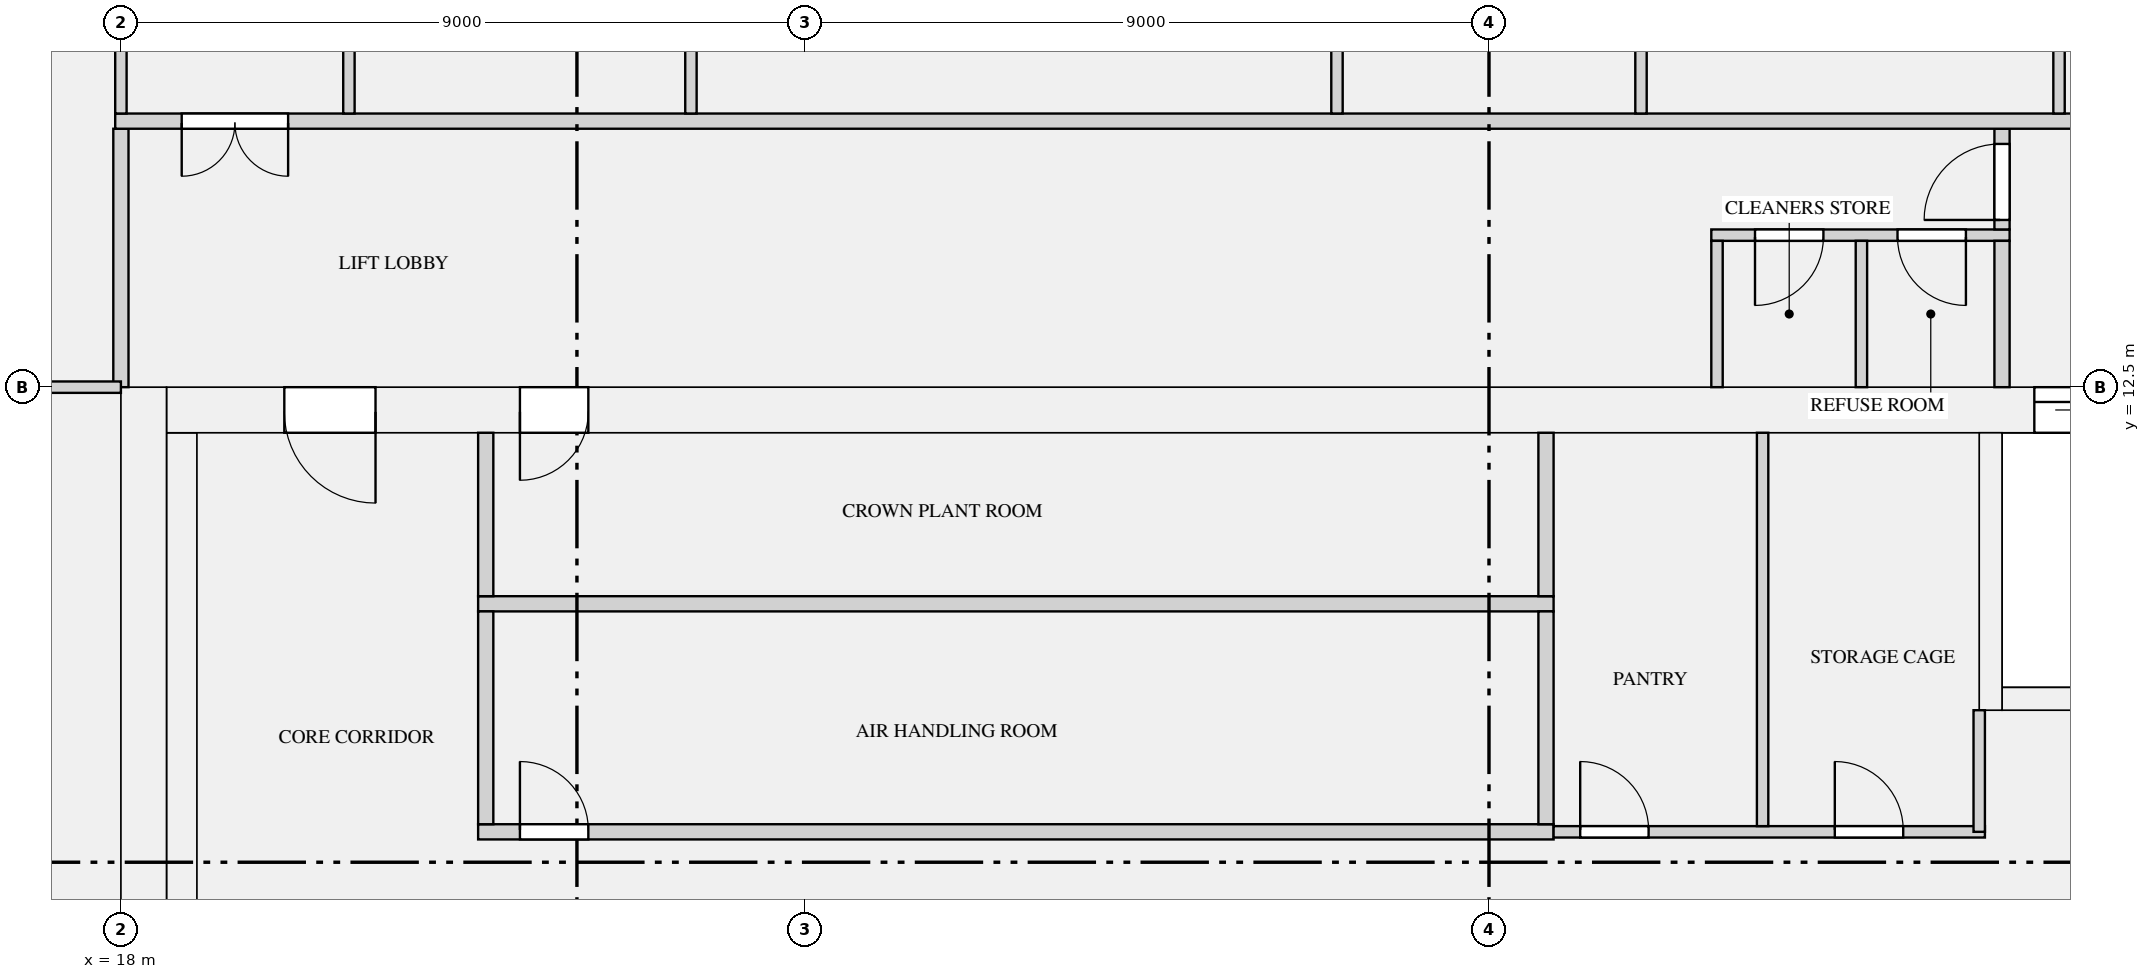
"""IFC4 building model, lengths in metres.
Left out: names, types, materials, properties, quantities, classifications, styles, units other than length and angle.
Written with IfcOpenShell. Run it as: python <this file> out.ifc"""

import sys

from ifc_helpers import new_model, si_unit, direction, frame, frame_2d, origin, place, context, subcontext, project, spatial, rectangle, extrude, element, fill, save


model = new_model("IFC4")
c1 = context("Model", 3, precision=1e-05, world=origin(), true_north=direction((0.0, 1.0)))
c2 = subcontext(c1, "Body", "Model", "MODEL_VIEW")
j1 = project(units=[si_unit("LENGTHUNIT", "METRE"), si_unit("PLANEANGLEUNIT", "RADIAN")], contexts=[c1])
p1 = place(None, origin())
s1 = spatial("IfcSite", under=j1, at=p1, CompositionType="ELEMENT")
p2 = place(p1, origin())
s2 = spatial("IfcBuilding", under=s1, at=p2, CompositionType="ELEMENT")
p3 = place(p2, frame((0.0, 0.0, 191.7)))
s3 = spatial("IfcBuildingStorey", under=s2, at=p3, CompositionType="ELEMENT", Elevation=191.7)
p4 = place(p3, frame((18.3, 0.0, 0.0), z_axis=(0.0, 0.0, 1.0), x_axis=(0.0, 1.0, 0.0)))
e1 = element("IfcWall", 1, at=p4, inside=s3, PredefinedType="SHEAR", context=c2, shape_type="SweptSolid", body=[
    extrude(rectangle(XDim=12.5, YDim=0.6, at=frame_2d((6.25, 0.0))), origin(), (0.0, 0.0, 1.0), 6.3),
])
p5 = place(p3, frame((18.6, 12.2, 0.0), z_axis=(0.0, 0.0, 1.0), x_axis=(1.0, 0.0, 0.0)))
e2 = element("IfcWall", 2, at=p5, inside=s3, PredefinedType="SHEAR", context=c2, shape_type="SweptSolid", body=[
    extrude(rectangle(XDim=34.8, YDim=0.6, at=frame_2d((17.4, 0.0))), origin(), (0.0, 0.0, 1.0), 6.3),
])
p6 = place(p5, frame((24.575, 0.0, 0.0)))
e3 = element("IfcOpeningElement", 3, at=p6, cuts=e2, PredefinedType="OPENING", context=c2, shape_type="SweptSolid", body=[
    extrude(rectangle(XDim=1.1, YDim=2.1, at=frame_2d((0.55, 1.05))), frame((0.0, 0.31, 0.0), z_axis=(0.0, -1.0, 0.0), x_axis=(1.0, 0.0, 0.0)), (0.0, 0.0, 1.0), 0.62),
])
p7 = place(p5, frame((26.825, 0.0, 0.0)))
e4 = element("IfcOpeningElement", 4, at=p7, cuts=e2, PredefinedType="OPENING", context=c2, shape_type="SweptSolid", body=[
    extrude(rectangle(XDim=1.1, YDim=2.1, at=frame_2d((0.55, 1.05))), frame((0.0, 0.31, 0.0), z_axis=(0.0, -1.0, 0.0), x_axis=(1.0, 0.0, 0.0)), (0.0, 0.0, 1.0), 0.62),
])
p8 = place(p5, frame((29.075, 0.0, 0.0)))
e5 = element("IfcOpeningElement", 5, at=p8, cuts=e2, PredefinedType="OPENING", context=c2, shape_type="SweptSolid", body=[
    extrude(rectangle(XDim=1.1, YDim=2.1, at=frame_2d((0.55, 1.05))), frame((0.0, 0.31, 0.0), z_axis=(0.0, -1.0, 0.0), x_axis=(1.0, 0.0, 0.0)), (0.0, 0.0, 1.0), 0.62),
])
p9 = place(p5, frame((4.65, 0.0, 0.0)))
e6 = element("IfcOpeningElement", 6, at=p9, cuts=e2, PredefinedType="OPENING", context=c2, shape_type="SweptSolid", body=[
    extrude(rectangle(XDim=0.9, YDim=2.1, at=frame_2d((0.45, 1.05))), frame((0.0, 0.31, 0.0), z_axis=(0.0, -1.0, 0.0), x_axis=(1.0, 0.0, 0.0)), (0.0, 0.0, 1.0), 0.62),
])
p10 = place(p5, frame((1.55, 0.0, 0.0)))
e7 = element("IfcOpeningElement", 7, at=p10, cuts=e2, PredefinedType="OPENING", context=c2, shape_type="SweptSolid", body=[
    extrude(rectangle(XDim=1.2, YDim=2.1, at=frame_2d((0.6, 1.05))), frame((0.0, 0.31, 0.0), z_axis=(0.0, -1.0, 0.0), x_axis=(1.0, 0.0, 0.0)), (0.0, 0.0, 1.0), 0.62),
])
p11 = place(p5, frame((32.05, 0.0, 0.0)))
e8 = element("IfcOpeningElement", 8, at=p11, cuts=e2, PredefinedType="OPENING", context=c2, shape_type="SweptSolid", body=[
    extrude(rectangle(XDim=1.2, YDim=2.1, at=frame_2d((0.6, 1.05))), frame((0.0, 0.31, 0.0), z_axis=(0.0, -1.0, 0.0), x_axis=(1.0, 0.0, 0.0)), (0.0, 0.0, 1.0), 0.62),
])
p12 = place(p3, frame((18.8, 1.0, 0.0), z_axis=(0.0, 0.0, 1.0), x_axis=(0.0, 1.0, 0.0)))
e9 = element("IfcWall", 9, at=p12, inside=s3, PredefinedType="SHEAR", context=c2, shape_type="SweptSolid", body=[
    extrude(rectangle(XDim=10.9, YDim=0.4, at=frame_2d((5.45, 0.0))), origin(), (0.0, 0.0, 1.0), 6.3),
])
p13 = place(p3, frame((42.75, 8.4, 0.0), z_axis=(0.0, 0.0, 1.0), x_axis=(1.0, 0.0, 0.0)))
e10 = element("IfcWall", 10, at=p13, inside=s3, PredefinedType="SHEAR", context=c2, shape_type="SweptSolid", body=[
    extrude(rectangle(XDim=1.95, YDim=0.3, at=frame_2d((0.975, 0.0))), origin(), (0.0, 0.0, 1.0), 6.3),
])
p14 = place(p3, frame((42.6, 8.25, 0.0), z_axis=(0.0, 0.0, 1.0), x_axis=(0.0, 1.0, 0.0)))
e11 = element("IfcWall", 11, at=p14, inside=s3, PredefinedType="SHEAR", context=c2, shape_type="SweptSolid", body=[
    extrude(rectangle(XDim=3.65, YDim=0.3, at=frame_2d((1.825, 0.0))), origin(), (0.0, 0.0, 1.0), 6.3),
])
p15 = place(p3, frame((22.7, 6.65, 0.0), z_axis=(0.0, 0.0, 1.0), x_axis=(1.0, 0.0, 0.0)))
e12 = element("IfcWall", 12, at=p15, inside=s3, PredefinedType="PARTITIONING", context=c2, shape_type="SweptSolid", body=[
    extrude(rectangle(XDim=14.15, YDim=0.2, at=frame_2d((7.075, 0.0))), origin(), (0.0, 0.0, 1.0), 5.98),
])
p16 = place(p15, frame((0.55, 0.0, 0.0)))
e13 = element("IfcOpeningElement", 13, at=p16, cuts=e12, PredefinedType="OPENING", context=c2, shape_type="SweptSolid", body=[
    extrude(rectangle(XDim=0.9, YDim=2.1, at=frame_2d((0.45, 1.05))), frame((0.0, 0.11, 0.0), z_axis=(0.0, -1.0, 0.0), x_axis=(1.0, 0.0, 0.0)), (0.0, 0.0, 1.0), 0.22),
])
p17 = place(p3, frame((36.85, 6.65, 0.0), z_axis=(0.0, 0.0, 1.0), x_axis=(1.0, 0.0, 0.0)))
e14 = element("IfcWall", 14, at=p17, inside=s3, PredefinedType="PARTITIONING", context=c2, shape_type="SweptSolid", body=[
    extrude(rectangle(XDim=5.675, YDim=0.15, at=frame_2d((2.837, 0.0))), origin(), (0.0, 0.0, 1.0), 5.98),
])
p18 = place(p17, frame((0.35, 0.0, 0.0)))
e15 = element("IfcOpeningElement", 15, at=p18, cuts=e14, PredefinedType="OPENING", context=c2, shape_type="SweptSolid", body=[
    extrude(rectangle(XDim=0.9, YDim=2.1, at=frame_2d((0.45, 1.05))), frame((0.0, 0.085, 0.0), z_axis=(0.0, -1.0, 0.0), x_axis=(1.0, 0.0, 0.0)), (0.0, 0.0, 1.0), 0.17),
])
p19 = place(p17, frame((3.7, 0.0, 0.0)))
e16 = element("IfcOpeningElement", 16, at=p19, cuts=e14, PredefinedType="OPENING", context=c2, shape_type="SweptSolid", body=[
    extrude(rectangle(XDim=0.9, YDim=2.1, at=frame_2d((0.45, 1.05))), frame((0.0, 0.085, 0.0), z_axis=(0.0, -1.0, 0.0), x_axis=(1.0, 0.0, 0.0)), (0.0, 0.0, 1.0), 0.17),
])
p20 = place(p3, frame((22.7, 9.65, 0.0), z_axis=(0.0, 0.0, 1.0), x_axis=(1.0, 0.0, 0.0)))
e17 = element("IfcWall", 17, at=p20, inside=s3, PredefinedType="PARTITIONING", context=c2, shape_type="SweptSolid", body=[
    extrude(rectangle(XDim=14.15, YDim=0.2, at=frame_2d((7.075, 0.0))), origin(), (0.0, 0.0, 1.0), 5.98),
])
p21 = place(p3, frame((38.925, 14.5, 0.0), z_axis=(0.0, 0.0, 1.0), x_axis=(1.0, 0.0, 0.0)))
e18 = element("IfcWall", 18, at=p21, inside=s3, PredefinedType="PARTITIONING", context=c2, shape_type="SweptSolid", body=[
    extrude(rectangle(XDim=3.925, YDim=0.15, at=frame_2d((1.962, 0.0))), origin(), (0.0, 0.0, 1.0), 5.98),
])
p22 = place(p21, frame((0.575, 0.0, 0.0)))
e19 = element("IfcOpeningElement", 19, at=p22, cuts=e18, PredefinedType="OPENING", context=c2, shape_type="SweptSolid", body=[
    extrude(rectangle(XDim=0.9, YDim=2.1, at=frame_2d((0.45, 1.05))), frame((0.0, 0.085, 0.0), z_axis=(0.0, -1.0, 0.0), x_axis=(1.0, 0.0, 0.0)), (0.0, 0.0, 1.0), 0.17),
])
p23 = place(p21, frame((2.45, 0.0, 0.0)))
e20 = element("IfcOpeningElement", 20, at=p23, cuts=e18, PredefinedType="OPENING", context=c2, shape_type="SweptSolid", body=[
    extrude(rectangle(XDim=0.9, YDim=2.1, at=frame_2d((0.45, 1.05))), frame((0.0, 0.085, 0.0), z_axis=(0.0, -1.0, 0.0), x_axis=(1.0, 0.0, 0.0)), (0.0, 0.0, 1.0), 0.17),
])
p24 = place(p3, frame((42.45, 6.65, 0.0), z_axis=(0.0, 0.0, 1.0), x_axis=(0.0, 1.0, 0.0)))
e21 = element("IfcWall", 21, at=p24, inside=s3, PredefinedType="PARTITIONING", context=c2, shape_type="SweptSolid", body=[
    extrude(rectangle(XDim=1.6, YDim=0.15, at=frame_2d((0.8, 0.0))), origin(), (0.0, 0.0, 1.0), 5.98),
])
p25 = place(p3, frame((39.6, 6.725, 0.0), z_axis=(0.0, 0.0, 1.0), x_axis=(0.0, 1.0, 0.0)))
e22 = element("IfcWall", 22, at=p25, inside=s3, PredefinedType="PARTITIONING", context=c2, shape_type="SweptSolid", body=[
    extrude(rectangle(XDim=5.175, YDim=0.15, at=frame_2d((2.587, 0.0))), origin(), (0.0, 0.0, 1.0), 5.98),
])
for number, where, z_axis, x_axis in (
    (23, (22.8, 6.75, 0.0), (0.0, 0.0, 1.0), (0.0, 1.0, 0.0)),
    (24, (36.75, 6.75, 0.0), (0.0, 0.0, 1.0), (0.0, 1.0, 0.0)),
):
    element("IfcWall", number, at=place(p3, frame(where, z_axis=z_axis, x_axis=x_axis)), inside=s3, PredefinedType="PARTITIONING", context=c2, shape_type="SweptSolid", body=[
        extrude(rectangle(XDim=2.8, YDim=0.2, at=frame_2d((1.4, 0.0))), origin(), (0.0, 0.0, 1.0), 5.98),
    ])
for number, where, z_axis, x_axis in (
    (25, (22.8, 9.75, 0.0), (0.0, 0.0, 1.0), (0.0, 1.0, 0.0)),
    (26, (36.75, 9.75, 0.0), (0.0, 0.0, 1.0), (0.0, 1.0, 0.0)),
):
    element("IfcWall", number, at=place(p3, frame(where, z_axis=z_axis, x_axis=x_axis)), inside=s3, PredefinedType="PARTITIONING", context=c2, shape_type="SweptSolid", body=[
        extrude(rectangle(XDim=2.15, YDim=0.2, at=frame_2d((1.075, 0.0))), origin(), (0.0, 0.0, 1.0), 5.98),
    ])
p26 = place(p3, frame((18.0, 12.5, 0.0), z_axis=(0.0, 0.0, 1.0), x_axis=(0.0, 1.0, 0.0)))
e27 = element("IfcWall", 27, at=p26, inside=s3, PredefinedType="PARTITIONING", context=c2, shape_type="SweptSolid", body=[
    extrude(rectangle(XDim=3.4, YDim=0.2, at=frame_2d((1.7, 0.0))), origin(), (0.0, 0.0, 1.0), 5.98),
])
for number, where, z_axis, x_axis in (
    (28, (39.0, 12.5, 0.0), (0.0, 0.0, 1.0), (0.0, 1.0, 0.0)),
    (29, (40.9, 12.5, 0.0), (0.0, 0.0, 1.0), (0.0, 1.0, 0.0)),
):
    element("IfcWall", number, at=place(p3, frame(where, z_axis=z_axis, x_axis=x_axis)), inside=s3, PredefinedType="PARTITIONING", context=c2, shape_type="SweptSolid", body=[
        extrude(rectangle(XDim=1.925, YDim=0.15, at=frame_2d((0.962, 0.0))), origin(), (0.0, 0.0, 1.0), 5.98),
    ])
p27 = place(p3, frame((42.75, 12.5, 0.0), z_axis=(0.0, 0.0, 1.0), x_axis=(0.0, 1.0, 0.0)))
e30 = element("IfcWall", 30, at=p27, inside=s3, PredefinedType="PARTITIONING", context=c2, shape_type="SweptSolid", body=[
    extrude(rectangle(XDim=1.925, YDim=0.2, at=frame_2d((0.962, 0.0))), origin(), (0.0, 0.0, 1.0), 5.98),
])
p28 = place(p3, frame((42.75, 14.575, 0.0), z_axis=(0.0, 0.0, 1.0), x_axis=(0.0, 1.0, 0.0)))
e31 = element("IfcWall", 31, at=p28, inside=s3, PredefinedType="PARTITIONING", context=c2, shape_type="SweptSolid", body=[
    extrude(rectangle(XDim=1.325, YDim=0.2, at=frame_2d((0.663, 0.0))), origin(), (0.0, 0.0, 1.0), 5.98),
])
p29 = place(p28, frame((0.125, 0.0, 0.0)))
e32 = element("IfcOpeningElement", 32, at=p29, cuts=e31, PredefinedType="OPENING", context=c2, shape_type="SweptSolid", body=[
    extrude(rectangle(XDim=1.0, YDim=2.1, at=frame_2d((0.5, 1.05))), frame((0.0, 0.11, 0.0), z_axis=(0.0, -1.0, 0.0), x_axis=(1.0, 0.0, 0.0)), (0.0, 0.0, 1.0), 0.22),
])
p30 = place(p3, frame((9.65, 12.5, 0.0), z_axis=(0.0, 0.0, 1.0), x_axis=(1.0, 0.0, 0.0)))
e33 = element("IfcWall", 33, at=p30, inside=s3, PredefinedType="PARTITIONING", context=c2, shape_type="SweptSolid", body=[
    extrude(rectangle(XDim=8.35, YDim=0.15, at=frame_2d((4.175, 0.0))), origin(), (0.0, 0.0, 1.0), 5.98),
])
p31 = place(p30, frame((3.65, 0.0, 0.0)))
e34 = element("IfcOpeningElement", 34, at=p31, cuts=e33, PredefinedType="OPENING", context=c2, shape_type="SweptSolid", body=[
    extrude(rectangle(XDim=0.9, YDim=2.1, at=frame_2d((0.45, 1.05))), frame((0.0, 0.085, 0.0), z_axis=(0.0, -1.0, 0.0), x_axis=(1.0, 0.0, 0.0)), (0.0, 0.0, 1.0), 0.17),
])
p32 = place(p3, frame((17.925, 16.0, 0.0), z_axis=(0.0, 0.0, 1.0), x_axis=(1.0, 0.0, 0.0)))
e35 = element("IfcWall", 35, at=p32, inside=s3, PredefinedType="PARTITIONING", context=c2, shape_type="SweptSolid", body=[
    extrude(rectangle(XDim=36.15, YDim=0.2, at=frame_2d((18.075, 0.0))), origin(), (0.0, 0.0, 1.0), 5.98),
])
p33 = place(p32, frame((0.875, 0.0, 0.0)))
e36 = element("IfcOpeningElement", 36, at=p33, cuts=e35, PredefinedType="OPENING", context=c2, shape_type="SweptSolid", body=[
    extrude(rectangle(XDim=1.4, YDim=2.1, at=frame_2d((0.7, 1.05))), frame((0.0, 0.11, 0.0), z_axis=(0.0, -1.0, 0.0), x_axis=(1.0, 0.0, 0.0)), (0.0, 0.0, 1.0), 0.22),
])
p34 = place(p32, frame((33.875, 0.0, 0.0)))
e37 = element("IfcOpeningElement", 37, at=p34, cuts=e35, PredefinedType="OPENING", context=c2, shape_type="SweptSolid", body=[
    extrude(rectangle(XDim=1.4, YDim=2.1, at=frame_2d((0.7, 1.05))), frame((0.0, 0.11, 0.0), z_axis=(0.0, -1.0, 0.0), x_axis=(1.0, 0.0, 0.0)), (0.0, 0.0, 1.0), 0.22),
])
p35 = place(p3, frame((18.0, 16.1, 0.0), z_axis=(0.0, 0.0, 1.0), x_axis=(0.0, 1.0, 0.0)))
e38 = element("IfcWall", 38, at=p35, inside=s3, PredefinedType="PARTITIONING", context=c2, shape_type="SweptSolid", body=[
    extrude(rectangle(XDim=7.825, YDim=0.15, at=frame_2d((3.913, 0.0))), origin(), (0.0, 0.0, 1.0), 5.98),
])
p36 = place(p35, frame((1.65, 0.0, 0.0)))
e39 = element("IfcOpeningElement", 39, at=p36, cuts=e38, PredefinedType="OPENING", context=c2, shape_type="SweptSolid", body=[
    extrude(rectangle(XDim=1.5, YDim=2.1, at=frame_2d((0.75, 1.05))), frame((0.0, 0.085, 0.0), z_axis=(0.0, -1.0, 0.0), x_axis=(1.0, 0.0, 0.0)), (0.0, 0.0, 1.0), 0.17),
])
p37 = place(p35, frame((5.25, 0.0, 0.0)))
e40 = element("IfcOpeningElement", 40, at=p37, cuts=e38, PredefinedType="OPENING", context=c2, shape_type="SweptSolid", body=[
    extrude(rectangle(XDim=0.9, YDim=2.1, at=frame_2d((0.45, 1.05))), frame((0.0, 0.085, 0.0), z_axis=(0.0, -1.0, 0.0), x_axis=(1.0, 0.0, 0.0)), (0.0, 0.0, 1.0), 0.17),
])
p38 = place(p3, frame((21.0, 16.1, 0.0), z_axis=(0.0, 0.0, 1.0), x_axis=(0.0, 1.0, 0.0)))
e41 = element("IfcWall", 41, at=p38, inside=s3, PredefinedType="PARTITIONING", context=c2, shape_type="SweptSolid", body=[
    extrude(rectangle(XDim=4.825, YDim=0.15, at=frame_2d((2.413, 0.0))), origin(), (0.0, 0.0, 1.0), 5.98),
])
p39 = place(p38, frame((1.95, 0.0, 0.0)))
e42 = element("IfcOpeningElement", 42, at=p39, cuts=e41, PredefinedType="OPENING", context=c2, shape_type="SweptSolid", body=[
    extrude(rectangle(XDim=0.9, YDim=2.1, at=frame_2d((0.45, 1.05))), frame((0.0, 0.085, 0.0), z_axis=(0.0, -1.0, 0.0), x_axis=(1.0, 0.0, 0.0)), (0.0, 0.0, 1.0), 0.17),
])
for number, where, z_axis, x_axis in (
    (43, (25.5, 16.1, 0.0), (0.0, 0.0, 1.0), (0.0, 1.0, 0.0)),
    (44, (34.0, 16.1, 0.0), (0.0, 0.0, 1.0), (0.0, 1.0, 0.0)),
    (45, (38.0, 16.1, 0.0), (0.0, 0.0, 1.0), (0.0, 1.0, 0.0)),
    (46, (43.5, 16.1, 0.0), (0.0, 0.0, 1.0), (0.0, 1.0, 0.0)),
):
    element("IfcWall", number, at=place(p3, frame(where, z_axis=z_axis, x_axis=x_axis)), inside=s3, PredefinedType="PARTITIONING", context=c2, shape_type="SweptSolid", body=[
        extrude(rectangle(XDim=4.825, YDim=0.15, at=frame_2d((2.413, 0.0))), origin(), (0.0, 0.0, 1.0), 5.98),
    ])
p40 = place(p6, origin())
e47 = element("IfcDoor", 47, at=p40, inside=s3, OperationType="DOUBLE_DOOR_SLIDING", PredefinedType="DOOR", context=c2, shape_type="SweptSolid", body=[
    extrude(rectangle(XDim=1.1, YDim=2.1, at=frame_2d((0.55, 1.05))), frame((0.0, 0.025, 0.0), z_axis=(0.0, -1.0, 0.0), x_axis=(1.0, 0.0, 0.0)), (0.0, 0.0, 1.0), 0.05),
])
fill(e3, e47)
p41 = place(p9, frame((0.9, 0.0, 0.0), z_axis=(0.0, 0.0, 1.0), x_axis=(-1.0, 0.0, 0.0)))
e48 = element("IfcDoor", 48, at=p41, inside=s3, OperationType="SINGLE_SWING_RIGHT", PredefinedType="DOOR", context=c2, shape_type="SweptSolid", body=[
    extrude(rectangle(XDim=0.9, YDim=2.1, at=frame_2d((0.45, 1.05))), frame((0.0, 0.025, 0.0), z_axis=(0.0, -1.0, 0.0), x_axis=(1.0, 0.0, 0.0)), (0.0, 0.0, 1.0), 0.05),
])
fill(e6, e48)
p42 = place(p16, origin())
e49 = element("IfcDoor", 49, at=p42, inside=s3, OperationType="SINGLE_SWING_LEFT", PredefinedType="DOOR", context=c2, shape_type="SweptSolid", body=[
    extrude(rectangle(XDim=0.9, YDim=2.1, at=frame_2d((0.45, 1.05))), frame((0.0, 0.025, 0.0), z_axis=(0.0, -1.0, 0.0), x_axis=(1.0, 0.0, 0.0)), (0.0, 0.0, 1.0), 0.05),
])
fill(e13, e49)
p43 = place(p22, frame((0.9, 0.0, 0.0), z_axis=(0.0, 0.0, 1.0), x_axis=(-1.0, 0.0, 0.0)))
e50 = element("IfcDoor", 50, at=p43, inside=s3, OperationType="SINGLE_SWING_RIGHT", PredefinedType="DOOR", context=c2, shape_type="SweptSolid", body=[
    extrude(rectangle(XDim=0.9, YDim=2.1, at=frame_2d((0.45, 1.05))), frame((0.0, 0.025, 0.0), z_axis=(0.0, -1.0, 0.0), x_axis=(1.0, 0.0, 0.0)), (0.0, 0.0, 1.0), 0.05),
])
fill(e19, e50)
p44 = place(p23, frame((0.9, 0.0, 0.0), z_axis=(0.0, 0.0, 1.0), x_axis=(-1.0, 0.0, 0.0)))
e51 = element("IfcDoor", 51, at=p44, inside=s3, OperationType="SINGLE_SWING_LEFT", PredefinedType="DOOR", context=c2, shape_type="SweptSolid", body=[
    extrude(rectangle(XDim=0.9, YDim=2.1, at=frame_2d((0.45, 1.05))), frame((0.0, 0.025, 0.0), z_axis=(0.0, -1.0, 0.0), x_axis=(1.0, 0.0, 0.0)), (0.0, 0.0, 1.0), 0.05),
])
fill(e20, e51)
p45 = place(p18, origin())
e52 = element("IfcDoor", 52, at=p45, inside=s3, OperationType="SINGLE_SWING_LEFT", PredefinedType="DOOR", context=c2, shape_type="SweptSolid", body=[
    extrude(rectangle(XDim=0.9, YDim=2.1, at=frame_2d((0.45, 1.05))), frame((0.0, 0.025, 0.0), z_axis=(0.0, -1.0, 0.0), x_axis=(1.0, 0.0, 0.0)), (0.0, 0.0, 1.0), 0.05),
])
fill(e15, e52)
p46 = place(p19, origin())
e53 = element("IfcDoor", 53, at=p46, inside=s3, OperationType="SINGLE_SWING_LEFT", PredefinedType="DOOR", context=c2, shape_type="SweptSolid", body=[
    extrude(rectangle(XDim=0.9, YDim=2.1, at=frame_2d((0.45, 1.05))), frame((0.0, 0.025, 0.0), z_axis=(0.0, -1.0, 0.0), x_axis=(1.0, 0.0, 0.0)), (0.0, 0.0, 1.0), 0.05),
])
fill(e16, e53)
p47 = place(p10, frame((1.2, 0.0, 0.0), z_axis=(0.0, 0.0, 1.0), x_axis=(-1.0, 0.0, 0.0)))
e54 = element("IfcDoor", 54, at=p47, inside=s3, OperationType="SINGLE_SWING_LEFT", PredefinedType="DOOR", context=c2, shape_type="SweptSolid", body=[
    extrude(rectangle(XDim=1.2, YDim=2.1, at=frame_2d((0.6, 1.05))), frame((0.0, 0.025, 0.0), z_axis=(0.0, -1.0, 0.0), x_axis=(1.0, 0.0, 0.0)), (0.0, 0.0, 1.0), 0.05),
])
fill(e7, e54)
p48 = place(p29, origin())
e55 = element("IfcDoor", 55, at=p48, inside=s3, OperationType="SINGLE_SWING_LEFT", PredefinedType="DOOR", context=c2, shape_type="SweptSolid", body=[
    extrude(rectangle(XDim=1.0, YDim=2.1, at=frame_2d((0.5, 1.05))), frame((0.0, 0.025, 0.0), z_axis=(0.0, -1.0, 0.0), x_axis=(1.0, 0.0, 0.0)), (0.0, 0.0, 1.0), 0.05),
])
fill(e32, e55)
p49 = place(p33, frame((1.4, 0.0, 0.0), z_axis=(0.0, 0.0, 1.0), x_axis=(-1.0, 0.0, 0.0)))
e56 = element("IfcDoor", 56, at=p49, inside=s3, OperationType="DOUBLE_DOOR_SINGLE_SWING", PredefinedType="DOOR", context=c2, shape_type="SweptSolid", body=[
    extrude(rectangle(XDim=1.4, YDim=2.1, at=frame_2d((0.7, 1.05))), frame((0.0, 0.025, 0.0), z_axis=(0.0, -1.0, 0.0), x_axis=(1.0, 0.0, 0.0)), (0.0, 0.0, 1.0), 0.05),
])
fill(e36, e56)
save(model, sys.argv[1])
